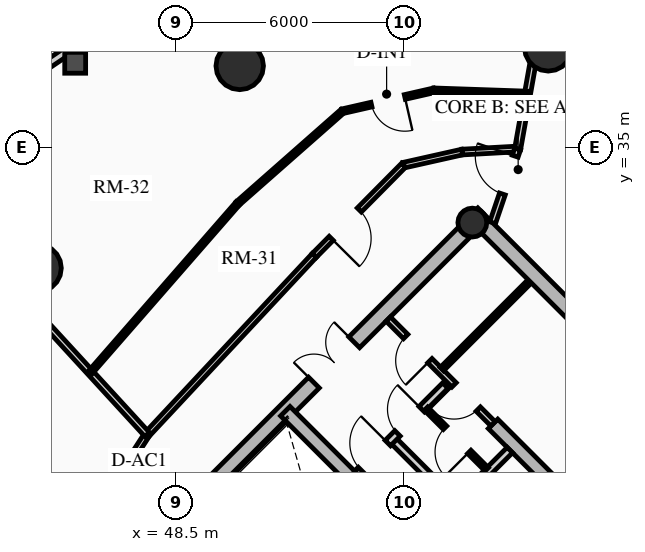
"""IFC4 building model, lengths in metres.
Left out: names, types, materials, properties, quantities, classifications, styles, units other than length and angle.
Written with IfcOpenShell. Run it as: python <this file> out.ifc"""

import sys

from ifc_helpers import new_model, si_unit, direction, frame, frame_2d, origin, origin_2d, place, context, subcontext, project, spatial, rectangle, circle, hollow_circle, extrude, source, transform, mapped, element, fill, save


model = new_model("IFC4")
c1 = context("Model", 3, precision=1e-05, world=origin(), true_north=direction((0.0, 1.0)))
c2 = subcontext(c1, "Body", "Model", "MODEL_VIEW")
j1 = project(units=[si_unit("LENGTHUNIT", "METRE"), si_unit("PLANEANGLEUNIT", "RADIAN")], contexts=[c1])
p1 = place(None, origin())
s1 = spatial("IfcSite", under=j1, at=p1, CompositionType="ELEMENT")
p2 = place(p1, origin())
s2 = spatial("IfcBuilding", under=s1, at=p2, CompositionType="ELEMENT")
p3 = place(p2, frame((0.0, 0.0, 166.15)))
s3 = spatial("IfcBuildingStorey", under=s2, at=p3, CompositionType="ELEMENT", Elevation=166.15)
p4 = place(p3, frame((66.268, 23.298, 0.0), z_axis=(0.0, 0.0, 1.0), x_axis=(-0.707106781187, 0.707106781187, 0.0)))
e1 = element("IfcWall", 1, at=p4, inside=s3, PredefinedType="SHEAR", context=c2, shape_type="SweptSolid", body=[
    extrude(rectangle(XDim=14.1, YDim=0.4, at=frame_2d((7.05, 0.0))), origin(), (0.0, 0.0, 1.0), 2.91),
])
p5 = place(p3, frame((48.873, 25.561, 0.0), z_axis=(0.0, 0.0, 1.0), x_axis=(0.707106781187, 0.707106781187, 0.0)))
e2 = element("IfcWall", 2, at=p5, inside=s3, PredefinedType="SHEAR", context=c2, shape_type="SweptSolid", body=[
    extrude(rectangle(XDim=10.7, YDim=0.4, at=frame_2d((5.35, 0.0))), origin(), (0.0, 0.0, 1.0), 2.91),
])
m1 = source(origin(), c2, "Body", "SweptSolid", [
    extrude(rectangle(XDim=1.5, YDim=2.02, at=frame_2d((0.75, 1.01))), frame((0.0, 0.21, 0.0), z_axis=(0.0, -1.0, 0.0), x_axis=(1.0, 0.0, 0.0)), (0.0, 0.0, 1.0), 0.42),
])
p6 = place(p5, frame((4.6, 0.0, 0.0)))
e3 = element("IfcOpeningElement", 3, at=p6, cuts=e2, PredefinedType="OPENING", context=c2, shape_type="MappedRepresentation", body=[
    mapped(m1, transform((0.0, 0.0, 0.0), x_axis=(1.0, 0.0, 0.0), y_axis=(0.0, 1.0, 0.0), z_axis=(0.0, 0.0, 1.0), scale=1.0)),
])
p7 = place(p3, frame((61.06, 18.373, 0.0), z_axis=(0.0, 0.0, 1.0), x_axis=(-0.707106781187, 0.707106781187, 0.0)))
e4 = element("IfcWall", 4, at=p7, inside=s3, PredefinedType="SHEAR", context=c2, shape_type="SweptSolid", body=[
    extrude(rectangle(XDim=13.7, YDim=0.35, at=frame_2d((6.85, 0.0))), origin(), (0.0, 0.0, 1.0), 2.91),
])
m2 = source(origin(), c2, "Body", "SweptSolid", [
    extrude(rectangle(XDim=1.1, YDim=2.015, at=frame_2d((0.55, 1.007))), frame((0.0, 0.185, 0.0), z_axis=(0.0, -1.0, 0.0), x_axis=(1.0, 0.0, 0.0)), (0.0, 0.0, 1.0), 0.37),
])
p8 = place(p7, frame((4.85, 0.0, 0.0)))
e5 = element("IfcOpeningElement", 5, at=p8, cuts=e4, PredefinedType="OPENING", context=c2, shape_type="MappedRepresentation", body=[
    mapped(m2, transform((0.0, 0.0, 0.0), x_axis=(1.0, 0.0, 0.0), y_axis=(0.0, 1.0, 0.0), z_axis=(0.0, 0.0, 1.0), scale=1.0)),
])
p9 = place(p7, frame((0.625, 0.0, 0.0)))
e6 = element("IfcOpeningElement", 6, at=p9, cuts=e4, PredefinedType="OPENING", context=c2, shape_type="MappedRepresentation", body=[
    mapped(m2, transform((0.0, 0.0, 0.0), x_axis=(1.0, 0.0, 0.0), y_axis=(0.0, 1.0, 0.0), z_axis=(0.0, 0.0, 1.0), scale=1.0)),
])
p10 = place(p7, frame((2.625, 0.0, 0.0)))
e7 = element("IfcOpeningElement", 7, at=p10, cuts=e4, PredefinedType="OPENING", context=c2, shape_type="MappedRepresentation", body=[
    mapped(m2, transform((0.0, 0.0, 0.0), x_axis=(1.0, 0.0, 0.0), y_axis=(0.0, 1.0, 0.0), z_axis=(0.0, 0.0, 1.0), scale=1.0)),
])
m3 = source(origin(), c2, "Body", "SweptSolid", [
    extrude(rectangle(XDim=1.15, YDim=2.02, at=frame_2d((0.575, 1.01))), frame((0.0, 0.185, 0.0), z_axis=(0.0, -1.0, 0.0), x_axis=(1.0, 0.0, 0.0)), (0.0, 0.0, 1.0), 0.37),
])
p11 = place(p7, frame((7.27, 0.0, 0.0)))
e8 = element("IfcOpeningElement", 8, at=p11, cuts=e4, PredefinedType="OPENING", context=c2, shape_type="MappedRepresentation", body=[
    mapped(m3, transform((0.0, 0.0, 0.0), x_axis=(1.0, 0.0, 0.0), y_axis=(0.0, 1.0, 0.0), z_axis=(0.0, 0.0, 1.0), scale=1.0)),
])
p12 = place(p3, frame((63.627, 20.94, 0.0), z_axis=(0.0, 0.0, 1.0), x_axis=(-0.707119496762, 0.707094065383, 0.0)))
e9 = element("IfcWall", 9, at=p12, inside=s3, PredefinedType="SHEAR", context=c2, shape_type="SweptSolid", body=[
    extrude(rectangle(XDim=9.6, YDim=0.35, at=frame_2d((4.8, 0.0))), origin(), (0.0, 0.0, 1.0), 2.91),
])
p13 = place(p12, frame((5.28, 0.0, 0.0)))
e10 = element("IfcOpeningElement", 10, at=p13, cuts=e9, PredefinedType="OPENING", context=c2, shape_type="MappedRepresentation", body=[
    mapped(m3, transform((0.0, 0.0, 0.0), x_axis=(1.0, 0.0, 0.0), y_axis=(0.0, 1.0, 0.0), z_axis=(0.0, 0.0, 1.0), scale=1.0)),
])
p14 = place(p3, frame((56.294, 33.024, 0.0), z_axis=(0.0, 0.0, 1.0), x_axis=(0.707106781187, 0.707106781187, 0.0)))
e11 = element("IfcColumn", 11, at=p14, inside=s3, PredefinedType="COLUMN", context=c2, shape_type="SweptSolid", body=[
    extrude(hollow_circle(Radius=0.38, WallThickness=0.032, at=origin_2d()), origin(), (0.0, 0.0, 1.0), 2.91),
])
for number, where, z_axis, x_axis in (
    (12, (58.291, 37.635, 0.0), (0.0, 0.0, 1.0), (1.0, 0.0, 0.0)),
    (13, (50.173, 37.146, 0.0), (0.0, 0.0, 1.0), (1.0, 0.0, 0.0)),
    (14, (44.854, 31.827, 0.0), (0.0, 0.0, 1.0), (1.0, 0.0, 0.0)),
):
    element("IfcColumn", number, at=place(p3, frame(where, z_axis=z_axis, x_axis=x_axis)), inside=s3, PredefinedType="USERDEFINED", context=c2, shape_type="SweptSolid", body=[
        extrude(circle(Radius=0.625, at=origin_2d()), origin(), (0.0, 0.0, 1.0), 2.91),
    ])
p15 = place(p3, frame((44.935, 37.065, 0.0), z_axis=(0.0, 0.0, 1.0), x_axis=(0.828739009952, 0.559635286042, 0.0)))
e15 = element("IfcWall", 15, at=p15, inside=s3, PredefinedType="SOLIDWALL", context=c2, shape_type="SweptSolid", body=[
    extrude(rectangle(XDim=4.569, YDim=0.22, at=frame_2d((2.284, 0.0))), origin(), (0.0, 0.0, 1.0), 2.675),
])
p16 = place(p3, frame((54.961, 24.719, 0.0), z_axis=(0.0, 0.0, 1.0), x_axis=(0.707106781187, 0.707106781187, 0.0)))
e16 = element("IfcWall", 16, at=p16, inside=s3, PredefinedType="PARTITIONING", context=c2, shape_type="SweptSolid", body=[
    extrude(rectangle(XDim=3.28, YDim=0.2, at=frame_2d((1.64, 0.0))), origin(), (0.0, 0.0, 1.0), 2.675),
])
m4 = source(origin(), c2, "Body", "SweptSolid", [
    extrude(rectangle(XDim=0.9, YDim=2.005, at=frame_2d((0.45, 1.002))), frame((0.0, 0.11, 0.0), z_axis=(0.0, -1.0, 0.0), x_axis=(1.0, 0.0, 0.0)), (0.0, 0.0, 1.0), 0.22),
])
p17 = place(p16, frame((0.16, 0.0, 0.0)))
e17 = element("IfcOpeningElement", 17, at=p17, cuts=e16, PredefinedType="OPENING", context=c2, shape_type="MappedRepresentation", body=[
    mapped(m4, transform((0.0, 0.0, 0.0), x_axis=(1.0, 0.0, 0.0), y_axis=(0.0, 1.0, 0.0), z_axis=(0.0, 0.0, 1.0), scale=1.0)),
])
p18 = place(p3, frame((55.874, 25.631, 0.0), z_axis=(0.0, 0.0, 1.0), x_axis=(-0.707157639372, 0.707055919343, 0.0)))
e18 = element("IfcWall", 18, at=p18, inside=s3, PredefinedType="PARTITIONING", context=c2, shape_type="SweptSolid", body=[
    extrude(rectangle(XDim=2.4, YDim=0.2, at=frame_2d((1.2, 0.0))), origin(), (0.0, 0.0, 1.0), 2.675),
])
p19 = place(p3, frame((53.264, 26.416, 0.0), z_axis=(0.0, 0.0, 1.0), x_axis=(0.707106781187, 0.707106781187, 0.0)))
e19 = element("IfcWall", 19, at=p19, inside=s3, PredefinedType="PARTITIONING", context=c2, shape_type="SweptSolid", body=[
    extrude(rectangle(XDim=3.28, YDim=0.2, at=frame_2d((1.64, 0.0))), origin(), (0.0, 0.0, 1.0), 2.675),
])
m5 = source(origin(), c2, "Body", "SweptSolid", [
    extrude(rectangle(XDim=1.0, YDim=2.015, at=frame_2d((0.5, 1.007))), frame((0.0, 0.11, 0.0), z_axis=(0.0, -1.0, 0.0), x_axis=(1.0, 0.0, 0.0)), (0.0, 0.0, 1.0), 0.22),
])
p20 = place(p19, frame((0.14, 0.0, 0.0)))
e20 = element("IfcOpeningElement", 20, at=p20, cuts=e19, PredefinedType="OPENING", context=c2, shape_type="MappedRepresentation", body=[
    mapped(m5, transform((0.0, 0.0, 0.0), x_axis=(1.0, 0.0, 0.0), y_axis=(0.0, 1.0, 0.0), z_axis=(0.0, 0.0, 1.0), scale=1.0)),
])
p21 = place(p19, frame((1.5, 0.0, 0.0)))
e21 = element("IfcOpeningElement", 21, at=p21, cuts=e19, PredefinedType="OPENING", context=c2, shape_type="MappedRepresentation", body=[
    mapped(m4, transform((0.0, 0.0, 0.0), x_axis=(1.0, 0.0, 0.0), y_axis=(0.0, 1.0, 0.0), z_axis=(0.0, 0.0, 1.0), scale=1.0)),
])
p22 = place(p3, frame((56.673, 26.529, 0.0), z_axis=(0.0, 0.0, 1.0), x_axis=(-0.707052764397, 0.70716079385, 0.0)))
e22 = element("IfcWall", 22, at=p22, inside=s3, PredefinedType="PARTITIONING", context=c2, shape_type="SweptSolid", body=[
    extrude(rectangle(XDim=2.26, YDim=0.125, at=frame_2d((1.13, 0.0))), origin(), (0.0, 0.0, 1.0), 2.675),
])
m6 = source(origin(), c2, "Body", "SweptSolid", [
    extrude(rectangle(XDim=0.9, YDim=2.005, at=frame_2d((0.45, 1.002))), frame((0.0, 0.073, 0.0), z_axis=(0.0, -1.0, 0.0), x_axis=(1.0, 0.0, 0.0)), (0.0, 0.0, 1.0), 0.145),
])
p23 = place(p22, frame((0.65, 0.0, 0.0)))
e23 = element("IfcOpeningElement", 23, at=p23, cuts=e22, PredefinedType="OPENING", context=c2, shape_type="MappedRepresentation", body=[
    mapped(m6, transform((0.0, 0.0, 0.0), x_axis=(1.0, 0.0, 0.0), y_axis=(0.0, 1.0, 0.0), z_axis=(0.0, 0.0, 1.0), scale=1.0)),
])
p24 = place(p3, frame((56.839, 27.728, 0.0), z_axis=(0.0, 0.0, 1.0), x_axis=(-0.707106781187, 0.707106781187, 0.0)))
e24 = element("IfcWall", 24, at=p24, inside=s3, PredefinedType="PARTITIONING", context=c2, shape_type="SweptSolid", body=[
    extrude(rectangle(XDim=3.9, YDim=0.16, at=frame_2d((1.95, 0.0))), origin(), (0.0, 0.0, 1.0), 2.675),
])
m7 = source(origin(), c2, "Body", "SweptSolid", [
    extrude(rectangle(XDim=0.9, YDim=2.005, at=frame_2d((0.45, 1.002))), frame((0.0, 0.09, 0.0), z_axis=(0.0, -1.0, 0.0), x_axis=(1.0, 0.0, 0.0)), (0.0, 0.0, 1.0), 0.18),
])
p25 = place(p24, frame((0.55, 0.0, 0.0)))
e25 = element("IfcOpeningElement", 25, at=p25, cuts=e24, PredefinedType="OPENING", context=c2, shape_type="MappedRepresentation", body=[
    mapped(m7, transform((0.0, 0.0, 0.0), x_axis=(1.0, 0.0, 0.0), y_axis=(0.0, 1.0, 0.0), z_axis=(0.0, 0.0, 1.0), scale=1.0)),
])
p26 = place(p24, frame((2.35, 0.0, 0.0)))
e26 = element("IfcOpeningElement", 26, at=p26, cuts=e24, PredefinedType="OPENING", context=c2, shape_type="MappedRepresentation", body=[
    mapped(m7, transform((0.0, 0.0, 0.0), x_axis=(1.0, 0.0, 0.0), y_axis=(0.0, 1.0, 0.0), z_axis=(0.0, 0.0, 1.0), scale=1.0)),
])
p27 = place(p3, frame((55.492, 29.167, 0.0), z_axis=(0.0, 0.0, 1.0), x_axis=(0.707144688645, 0.707068871696, 0.0)))
e27 = element("IfcWall", 27, at=p27, inside=s3, PredefinedType="PARTITIONING", context=c2, shape_type="SweptSolid", body=[
    extrude(rectangle(XDim=3.22, YDim=0.125, at=frame_2d((1.61, 0.0))), origin(), (0.0, 0.0, 1.0), 2.212),
])
p28 = place(p3, frame((57.486, 34.96, 0.0), z_axis=(0.0, 0.0, 1.0), x_axis=(-0.998483871836, -0.055045051404, 0.0)))
e28 = element("IfcWall", 28, at=p28, inside=s3, PredefinedType="PARTITIONING", context=c2, shape_type="SweptSolid", body=[
    extrude(rectangle(XDim=1.464, YDim=0.15, at=frame_2d((0.732, 0.0))), origin(), (0.0, 0.0, 1.0), 2.245),
])
p29 = place(p3, frame((56.025, 34.88, 0.0), z_axis=(0.0, 0.0, 1.0), x_axis=(-0.975729093394, -0.218981132301, 0.0)))
e29 = element("IfcWall", 29, at=p29, inside=s3, PredefinedType="PARTITIONING", context=c2, shape_type="SweptSolid", body=[
    extrude(rectangle(XDim=1.575, YDim=0.15, at=frame_2d((0.788, 0.0))), origin(), (0.0, 0.0, 1.0), 2.245),
])
p30 = place(p3, frame((54.488, 34.535, 0.0), z_axis=(0.0, 0.0, 1.0), x_axis=(-0.703666289339, -0.710530613871, 0.0)))
e30 = element("IfcWall", 30, at=p30, inside=s3, PredefinedType="PARTITIONING", context=c2, shape_type="SweptSolid", body=[
    extrude(rectangle(XDim=3.343, YDim=0.15, at=frame_2d((1.672, 0.0))), origin(), (0.0, 0.0, 1.0), 2.245),
])
m8 = source(origin(), c2, "Body", "SweptSolid", [
    extrude(rectangle(XDim=1.05, YDim=2.015, at=frame_2d((0.525, 1.007))), frame((0.0, 0.085, 0.0), z_axis=(0.0, -1.0, 0.0), x_axis=(1.0, 0.0, 0.0)), (0.0, 0.0, 1.0), 0.17),
])
p31 = place(p30, frame((1.66, 0.0, 0.0)))
e31 = element("IfcOpeningElement", 31, at=p31, cuts=e30, PredefinedType="OPENING", context=c2, shape_type="MappedRepresentation", body=[
    mapped(m8, transform((0.0, 0.0, 0.0), x_axis=(1.0, 0.0, 0.0), y_axis=(0.0, 1.0, 0.0), z_axis=(0.0, 0.0, 1.0), scale=1.0)),
])
p32 = place(p3, frame((52.135, 32.159, 0.0), z_axis=(0.0, 0.0, 1.0), x_axis=(-0.682546302454, -0.730842353047, 0.0)))
e32 = element("IfcWall", 32, at=p32, inside=s3, PredefinedType="PARTITIONING", context=c2, shape_type="SweptSolid", body=[
    extrude(rectangle(XDim=6.445, YDim=0.15, at=frame_2d((3.223, 0.0))), origin(), (0.0, 0.0, 1.0), 2.245),
])
p33 = place(p3, frame((47.736, 27.449, 0.0), z_axis=(0.0, 0.0, 1.0), x_axis=(-0.542589259408, -0.839998152126, 0.0)))
e33 = element("IfcWall", 33, at=p33, inside=s3, PredefinedType="PARTITIONING", context=c2, shape_type="SweptSolid", body=[
    extrude(rectangle(XDim=1.912, YDim=0.15, at=frame_2d((0.956, 0.0))), origin(), (0.0, 0.0, 1.0), 2.245),
])
p34 = place(p3, frame((57.486, 34.96, 0.0), z_axis=(0.0, 0.0, 1.0), x_axis=(0.175432895983, 0.984491391027, 0.0)))
e34 = element("IfcWall", 34, at=p34, inside=s3, PredefinedType="PARTITIONING", context=c2, shape_type="SweptSolid", body=[
    extrude(rectangle(XDim=5.291, YDim=0.16, at=frame_2d((2.646, 0.0))), origin(), (0.0, 0.0, 1.0), 2.245),
])
p35 = place(p3, frame((47.736, 27.449, 0.0), z_axis=(0.0, 0.0, 1.0), x_axis=(-0.676056254668, 0.736850012231, 0.0)))
e35 = element("IfcWall", 35, at=p35, inside=s3, PredefinedType="PARTITIONING", context=c2, shape_type="SweptSolid", body=[
    extrude(rectangle(XDim=7.899, YDim=0.16, at=frame_2d((3.95, 0.0))), origin(), (0.0, 0.0, 1.0), 2.245),
])
p36 = place(p3, frame((56.828, 33.021, 0.0), z_axis=(0.0, 0.0, 1.0), x_axis=(0.321300161671, 0.94697740528, 0.0)))
e36 = element("IfcWall", 36, at=p36, inside=s3, PredefinedType="PARTITIONING", context=c2, shape_type="SweptSolid", body=[
    extrude(rectangle(XDim=2.049, YDim=0.16, at=frame_2d((1.024, 0.0))), origin(), (0.0, 0.0, 1.0), 2.245),
])
m9 = source(origin(), c2, "Body", "SweptSolid", [
    extrude(rectangle(XDim=1.05, YDim=2.015, at=frame_2d((0.525, 1.007))), frame((0.0, 0.09, 0.0), z_axis=(0.0, -1.0, 0.0), x_axis=(1.0, 0.0, 0.0)), (0.0, 0.0, 1.0), 0.18),
])
p37 = place(p36, frame((0.798, 0.0, 0.0)))
e37 = element("IfcOpeningElement", 37, at=p37, cuts=e36, PredefinedType="OPENING", context=c2, shape_type="MappedRepresentation", body=[
    mapped(m9, transform((0.0, 0.0, 0.0), x_axis=(1.0, 0.0, 0.0), y_axis=(0.0, 1.0, 0.0), z_axis=(0.0, 0.0, 1.0), scale=1.0)),
])
p38 = place(p3, frame((57.746, 36.419, 0.0), z_axis=(0.0, 0.0, 1.0), x_axis=(-0.999409872703, 0.03434976484, 0.0)))
e38 = element("IfcWall", 38, at=p38, inside=s3, PredefinedType="PARTITIONING", context=c2, shape_type="SweptSolid", body=[
    extrude(rectangle(XDim=2.466, YDim=0.125, at=frame_2d((1.233, 0.0))), origin(), (0.0, 0.0, 1.0), 2.245),
])
p39 = place(p3, frame((55.281, 36.504, 0.0), z_axis=(0.0, 0.0, 1.0), x_axis=(-0.974908832019, -0.222604513096, 0.0)))
e39 = element("IfcWall", 39, at=p39, inside=s3, PredefinedType="PARTITIONING", context=c2, shape_type="SweptSolid", body=[
    extrude(rectangle(XDim=2.468, YDim=0.125, at=frame_2d((1.234, 0.0))), origin(), (0.0, 0.0, 1.0), 2.245),
])
p40 = place(p39, frame((0.784, 0.0, 0.0)))
e40 = element("IfcOpeningElement", 40, at=p40, cuts=e39, PredefinedType="OPENING", context=c2, shape_type="MappedRepresentation", body=[
    mapped(m6, transform((0.0, 0.0, 0.0), x_axis=(1.0, 0.0, 0.0), y_axis=(0.0, 1.0, 0.0), z_axis=(0.0, 0.0, 1.0), scale=1.0)),
])
p41 = place(p3, frame((52.876, 35.954, 0.0), z_axis=(0.0, 0.0, 1.0), x_axis=(-0.750317340408, -0.661077823469, 0.0)))
e41 = element("IfcWall", 41, at=p41, inside=s3, PredefinedType="PARTITIONING", context=c2, shape_type="SweptSolid", body=[
    extrude(rectangle(XDim=3.669, YDim=0.125, at=frame_2d((1.834, 0.0))), origin(), (0.0, 0.0, 1.0), 2.245),
])
p42 = place(p3, frame((50.123, 33.529, 0.0), z_axis=(0.0, 0.0, 1.0), x_axis=(-0.657371249324, -0.753566878626, 0.0)))
e42 = element("IfcWall", 42, at=p42, inside=s3, PredefinedType="PARTITIONING", context=c2, shape_type="SweptSolid", body=[
    extrude(rectangle(XDim=5.906, YDim=0.125, at=frame_2d((2.953, 0.0))), origin(), (0.0, 0.0, 1.0), 2.245),
])
m10 = source(origin(), c2, "Body", "SweptSolid", [
    extrude(rectangle(XDim=1.5, YDim=2.02, at=frame_2d((0.75, 1.01))), frame((0.0, 0.025, 0.0), z_axis=(0.0, -1.0, 0.0), x_axis=(1.0, 0.0, 0.0)), (0.0, 0.0, 1.0), 0.05),
])
p43 = place(p6, origin())
e43 = element("IfcDoor", 43, at=p43, inside=s3, OperationType="DOUBLE_DOOR_SINGLE_SWING", PredefinedType="DOOR", context=c2, shape_type="MappedRepresentation", body=[
    mapped(m10, transform((0.0, 0.0, 0.0), x_axis=(1.0, 0.0, 0.0), y_axis=(0.0, 1.0, 0.0), z_axis=(0.0, 0.0, 1.0), scale=1.0)),
])
fill(e3, e43)
m11 = source(origin(), c2, "Body", "SweptSolid", [
    extrude(rectangle(XDim=1.0, YDim=2.015, at=frame_2d((0.5, 1.007))), frame((0.0, 0.025, 0.0), z_axis=(0.0, -1.0, 0.0), x_axis=(1.0, 0.0, 0.0)), (0.0, 0.0, 1.0), 0.05),
])
p44 = place(p20, origin())
e44 = element("IfcDoor", 44, at=p44, inside=s3, OperationType="SINGLE_SWING_RIGHT", PredefinedType="DOOR", context=c2, shape_type="MappedRepresentation", body=[
    mapped(m11, transform((0.0, 0.0, 0.0), x_axis=(1.0, 0.0, 0.0), y_axis=(0.0, 1.0, 0.0), z_axis=(0.0, 0.0, 1.0), scale=1.0)),
])
fill(e20, e44)
m12 = source(origin(), c2, "Body", "SweptSolid", [
    extrude(rectangle(XDim=0.9, YDim=2.005, at=frame_2d((0.45, 1.002))), frame((0.0, 0.025, 0.0), z_axis=(0.0, -1.0, 0.0), x_axis=(1.0, 0.0, 0.0)), (0.0, 0.0, 1.0), 0.05),
])
p45 = place(p21, origin())
e45 = element("IfcDoor", 45, at=p45, inside=s3, OperationType="SINGLE_SWING_RIGHT", PredefinedType="DOOR", context=c2, shape_type="MappedRepresentation", body=[
    mapped(m12, transform((0.0, 0.0, 0.0), x_axis=(1.0, 0.0, 0.0), y_axis=(0.0, 1.0, 0.0), z_axis=(0.0, 0.0, 1.0), scale=1.0)),
])
fill(e21, e45)
p46 = place(p23, origin())
e46 = element("IfcDoor", 46, at=p46, inside=s3, OperationType="SINGLE_SWING_LEFT", PredefinedType="DOOR", context=c2, shape_type="MappedRepresentation", body=[
    mapped(m12, transform((0.0, 0.0, 0.0), x_axis=(1.0, 0.0, 0.0), y_axis=(0.0, 1.0, 0.0), z_axis=(0.0, 0.0, 1.0), scale=1.0)),
])
fill(e23, e46)
p47 = place(p25, origin())
e47 = element("IfcDoor", 47, at=p47, inside=s3, OperationType="SINGLE_SWING_RIGHT", PredefinedType="DOOR", context=c2, shape_type="MappedRepresentation", body=[
    mapped(m12, transform((0.0, 0.0, 0.0), x_axis=(1.0, 0.0, 0.0), y_axis=(0.0, 1.0, 0.0), z_axis=(0.0, 0.0, 1.0), scale=1.0)),
])
fill(e25, e47)
p48 = place(p26, origin())
e48 = element("IfcDoor", 48, at=p48, inside=s3, OperationType="SINGLE_SWING_LEFT", PredefinedType="DOOR", context=c2, shape_type="MappedRepresentation", body=[
    mapped(m12, transform((0.0, 0.0, 0.0), x_axis=(1.0, 0.0, 0.0), y_axis=(0.0, 1.0, 0.0), z_axis=(0.0, 0.0, 1.0), scale=1.0)),
])
fill(e26, e48)
m13 = source(origin(), c2, "Body", "SweptSolid", [
    extrude(rectangle(XDim=1.05, YDim=2.015, at=frame_2d((0.525, 1.007))), frame((0.0, 0.025, 0.0), z_axis=(0.0, -1.0, 0.0), x_axis=(1.0, 0.0, 0.0)), (0.0, 0.0, 1.0), 0.05),
])
p49 = place(p37, origin())
e49 = element("IfcDoor", 49, at=p49, inside=s3, OperationType="SINGLE_SWING_RIGHT", PredefinedType="DOOR", context=c2, shape_type="MappedRepresentation", body=[
    mapped(m13, transform((0.0, 0.0, 0.0), x_axis=(1.0, 0.0, 0.0), y_axis=(0.0, 1.0, 0.0), z_axis=(0.0, 0.0, 1.0), scale=1.0)),
])
fill(e37, e49)
p50 = place(p31, origin())
e50 = element("IfcDoor", 50, at=p50, inside=s3, OperationType="SINGLE_SWING_RIGHT", PredefinedType="DOOR", context=c2, shape_type="MappedRepresentation", body=[
    mapped(m13, transform((0.0, 0.0, 0.0), x_axis=(1.0, 0.0, 0.0), y_axis=(0.0, 1.0, 0.0), z_axis=(0.0, 0.0, 1.0), scale=1.0)),
])
fill(e31, e50)
p51 = place(p40, origin())
e51 = element("IfcDoor", 51, at=p51, inside=s3, OperationType="SINGLE_SWING_LEFT", PredefinedType="DOOR", context=c2, shape_type="MappedRepresentation", body=[
    mapped(m12, transform((0.0, 0.0, 0.0), x_axis=(1.0, 0.0, 0.0), y_axis=(0.0, 1.0, 0.0), z_axis=(0.0, 0.0, 1.0), scale=1.0)),
])
fill(e40, e51)
save(model, sys.argv[1])
